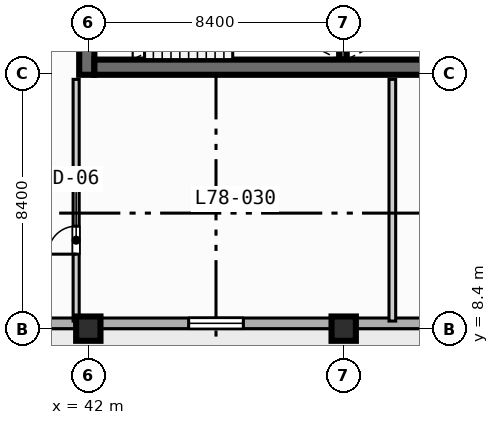
"""IFC4 building model, lengths in metres.
Left out: names, types, materials, properties, quantities, classifications, styles, units other than length and angle.
Written with IfcOpenShell. Run it as: python <this file> out.ifc"""

import sys

from ifc_helpers import new_model, si_unit, direction, frame, frame_2d, origin, origin_2d, place, context, subcontext, project, spatial, rectangle, extrude, element, fill, save


model = new_model("IFC4")
c1 = context("Model", 3, precision=1e-05, world=origin(), true_north=direction((0.0, 1.0)))
c2 = subcontext(c1, "Body", "Model", "MODEL_VIEW")
j1 = project(units=[si_unit("LENGTHUNIT", "METRE"), si_unit("PLANEANGLEUNIT", "RADIAN")], contexts=[c1])
p1 = place(None, origin())
s1 = spatial("IfcSite", under=j1, at=p1, CompositionType="ELEMENT")
p2 = place(p1, origin())
s2 = spatial("IfcBuilding", under=s1, at=p2, CompositionType="ELEMENT")
p3 = place(p2, frame((0.0, 0.0, 316.4)))
s3 = spatial("IfcBuildingStorey", under=s2, at=p3, CompositionType="ELEMENT", Elevation=316.4)
p4 = place(p3, frame((50.375, 17.25, 0.0), z_axis=(0.0, 0.0, 1.0), x_axis=(0.0, 1.0, 0.0)))
e1 = element("IfcWall", 1, at=p4, inside=s3, PredefinedType="SOLIDWALL", context=c2, shape_type="SweptSolid", body=[
    extrude(rectangle(XDim=3.5, YDim=0.25, at=frame_2d((1.75, 0.0))), origin(), (0.0, 0.0, 1.0), 3.67),
])
p5 = place(p3, frame((41.95, 16.75, 0.0), z_axis=(0.0, 0.0, 1.0), x_axis=(0.0, 1.0, 0.0)))
e2 = element("IfcWall", 2, at=p5, inside=s3, PredefinedType="SHEAR", context=c2, shape_type="SweptSolid", body=[
    extrude(rectangle(XDim=1.25, YDim=0.5, at=frame_2d((0.625, 0.0))), origin(), (0.0, 0.0, 1.0), 3.67),
])
p6 = place(p3, frame((42.2, 17.0, 0.0), z_axis=(0.0, 0.0, 1.0), x_axis=(1.0, 0.0, 0.0)))
e3 = element("IfcWall", 3, at=p6, inside=s3, PredefinedType="SHEAR", context=c2, shape_type="SweptSolid", body=[
    extrude(rectangle(XDim=16.35, YDim=0.5, at=frame_2d((8.175, 0.0))), origin(), (0.0, 0.0, 1.0), 3.67),
])
for number, where, z_axis, x_axis in (
    (4, (42.0, 8.4, 0.0), (0.0, 0.0, 1.0), (1.0, 0.0, 0.0)),
    (5, (50.4, 8.4, 0.0), (0.0, 0.0, 1.0), (1.0, 0.0, 0.0)),
):
    element("IfcColumn", number, at=place(p3, frame(where, z_axis=z_axis, x_axis=x_axis)), inside=s3, PredefinedType="COLUMN", context=c2, shape_type="SweptSolid", body=[
        extrude(rectangle(XDim=0.8, YDim=0.8, at=origin_2d()), origin(), (0.0, 0.0, 1.0), 3.9),
    ])
p7 = place(p3, frame((64.025, 8.575, 0.0), z_axis=(0.0, 0.0, 1.0), x_axis=(-1.0, 0.0, 0.0)))
e6 = element("IfcWall", 6, at=p7, inside=s3, PredefinedType="STANDARD", context=c2, shape_type="SweptSolid", body=[
    extrude(rectangle(XDim=52.45, YDim=0.35, at=frame_2d((26.225, 0.0))), origin(), (0.0, 0.0, 1.0), 3.67),
])
p8 = place(p7, frame((33.925, 0.0, 0.0)))
e7 = element("IfcOpeningElement", 7, at=p8, cuts=e6, PredefinedType="OPENING", context=c2, shape_type="SweptSolid", body=[
    extrude(rectangle(XDim=1.4, YDim=2.2, at=frame_2d((0.7, 1.1))), frame((0.0, 0.185, 0.0), z_axis=(0.0, -1.0, 0.0), x_axis=(1.0, 0.0, 0.0)), (0.0, 0.0, 1.0), 0.37),
])
p9 = place(p7, frame((41.825, 0.0, 0.85)))
e8 = element("IfcOpeningElement", 8, at=p9, cuts=e6, PredefinedType="OPENING", context=c2, shape_type="SweptSolid", body=[
    extrude(rectangle(XDim=2.4, YDim=1.95, at=frame_2d((1.2, 0.975))), frame((0.0, 0.185, 0.0), z_axis=(0.0, -1.0, 0.0), x_axis=(1.0, 0.0, 0.0)), (0.0, 0.0, 1.0), 0.37),
])
p10 = place(p7, frame((25.025, 0.0, 0.85)))
e9 = element("IfcOpeningElement", 9, at=p10, cuts=e6, PredefinedType="OPENING", context=c2, shape_type="SweptSolid", body=[
    extrude(rectangle(XDim=2.4, YDim=1.95, at=frame_2d((1.2, 0.975))), frame((0.0, 0.185, 0.0), z_axis=(0.0, -1.0, 0.0), x_axis=(1.0, 0.0, 0.0)), (0.0, 0.0, 1.0), 0.37),
])
p11 = place(p7, frame((16.925, 0.0, 0.85)))
e10 = element("IfcOpeningElement", 10, at=p11, cuts=e6, PredefinedType="OPENING", context=c2, shape_type="SweptSolid", body=[
    extrude(rectangle(XDim=1.8, YDim=1.8, at=frame_2d((0.9, 0.9))), frame((0.0, 0.185, 0.0), z_axis=(0.0, -1.0, 0.0), x_axis=(1.0, 0.0, 0.0)), (0.0, 0.0, 1.0), 0.37),
])
p12 = place(p7, frame((50.275, 0.0, 0.85)))
e11 = element("IfcOpeningElement", 11, at=p12, cuts=e6, PredefinedType="OPENING", context=c2, shape_type="SweptSolid", body=[
    extrude(rectangle(XDim=1.8, YDim=1.8, at=frame_2d((0.9, 0.9))), frame((0.0, 0.185, 0.0), z_axis=(0.0, -1.0, 0.0), x_axis=(1.0, 0.0, 0.0)), (0.0, 0.0, 1.0), 0.37),
])
p13 = place(p3, frame((41.6, 8.65, 0.0), z_axis=(0.0, 0.0, 1.0), x_axis=(0.0, 1.0, 0.0)))
e12 = element("IfcWall", 12, at=p13, inside=s3, PredefinedType="PARTITIONING", context=c2, shape_type="SweptSolid", body=[
    extrude(rectangle(XDim=7.95, YDim=0.2, at=frame_2d((3.975, 0.0))), origin(), (0.0, 0.0, 1.0), 3.67),
])
p14 = place(p13, frame((2.2, 0.0, 0.0)))
e13 = element("IfcOpeningElement", 13, at=p14, cuts=e12, PredefinedType="OPENING", context=c2, shape_type="SweptSolid", body=[
    extrude(rectangle(XDim=0.92, YDim=2.1, at=frame_2d((0.46, 1.05))), frame((0.0, 0.11, 0.0), z_axis=(0.0, -1.0, 0.0), x_axis=(1.0, 0.0, 0.0)), (0.0, 0.0, 1.0), 0.22),
])
p15 = place(p3, frame((52.0, 8.65, 0.0), z_axis=(0.0, 0.0, 1.0), x_axis=(0.0, 1.0, 0.0)))
e14 = element("IfcWall", 14, at=p15, inside=s3, PredefinedType="PARTITIONING", context=c2, shape_type="SweptSolid", body=[
    extrude(rectangle(XDim=7.95, YDim=0.22, at=frame_2d((3.975, 0.0))), origin(), (0.0, 0.0, 1.0), 3.67),
])
p16 = place(p11, origin())
e15 = element("IfcWindow", 15, at=p16, inside=s3, PartitioningType="SINGLE_PANEL", PredefinedType="WINDOW", context=c2, shape_type="SweptSolid", body=[
    extrude(rectangle(XDim=1.8, YDim=1.8, at=frame_2d((0.9, 0.9))), frame((0.0, 0.03, 0.0), z_axis=(0.0, -1.0, 0.0), x_axis=(1.0, 0.0, 0.0)), (0.0, 0.0, 1.0), 0.06),
])
fill(e10, e15)
p17 = place(p14, origin())
e16 = element("IfcDoor", 16, at=p17, inside=s3, OperationType="SINGLE_SWING_LEFT", PredefinedType="DOOR", context=c2, shape_type="SweptSolid", body=[
    extrude(rectangle(XDim=0.92, YDim=2.1, at=frame_2d((0.46, 1.05))), frame((0.0, 0.025, 0.0), z_axis=(0.0, -1.0, 0.0), x_axis=(1.0, 0.0, 0.0)), (0.0, 0.0, 1.0), 0.05),
])
fill(e13, e16)
save(model, sys.argv[1])
